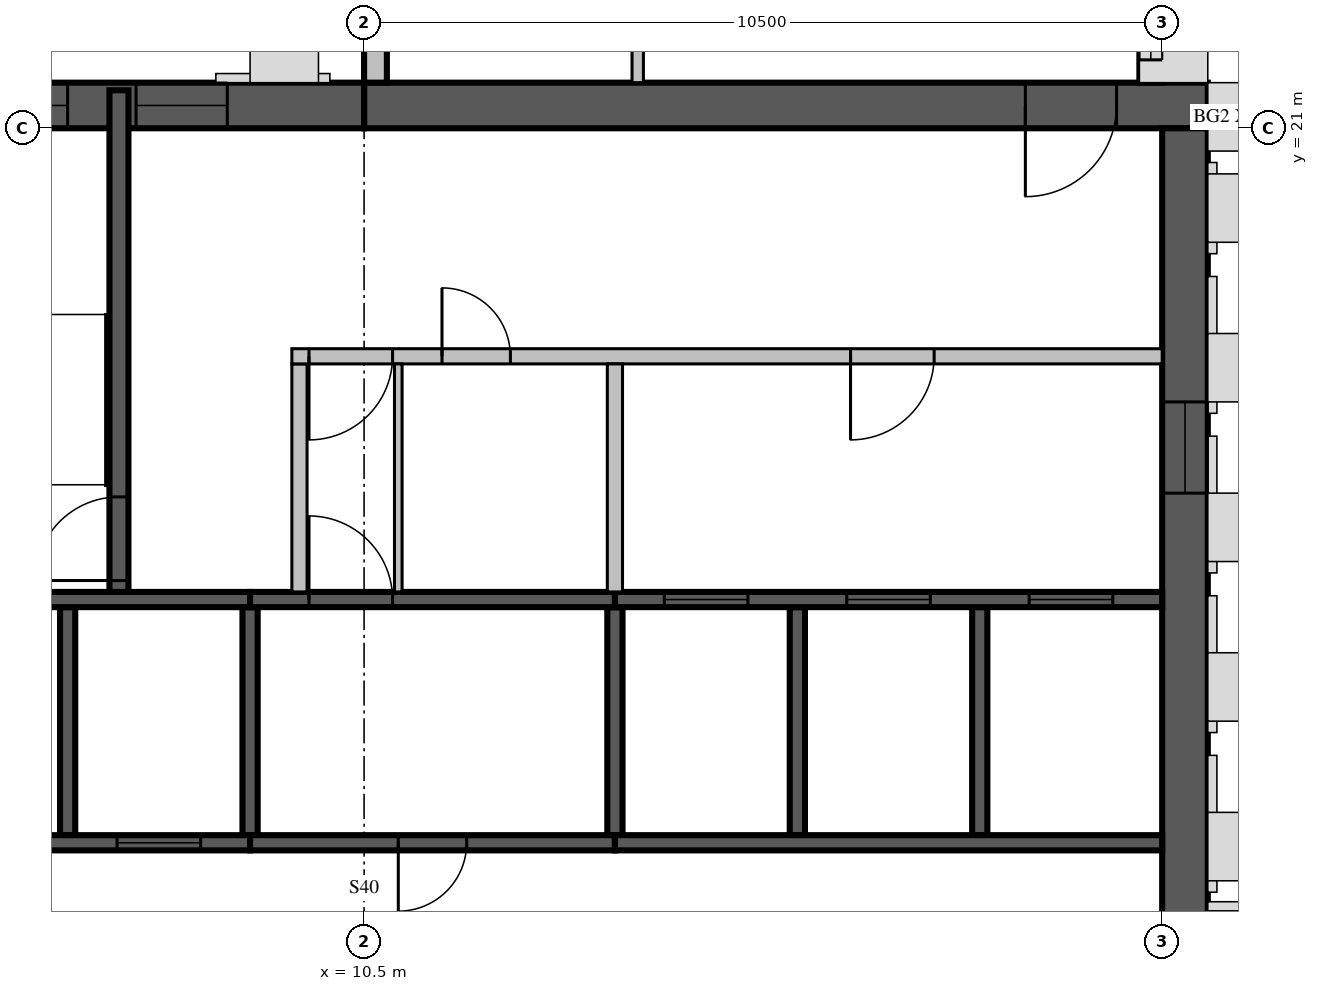
"""IFC4 building model, lengths in metres.
Left out: names, types, materials, properties, quantities, classifications, styles, units other than length and angle.
Written with IfcOpenShell. Run it as: python <this file> out.ifc"""

import sys

from ifc_helpers import new_model, si_unit, direction, frame, frame_2d, origin, place, context, subcontext, project, spatial, rectangle, extrude, source, transform, mapped, element, fill, save


model = new_model("IFC4")
c1 = context("Model", 3, precision=1e-05, world=origin(), true_north=direction((0.0, 1.0)))
c2 = subcontext(c1, "Body", "Model", "MODEL_VIEW")
j1 = project(units=[si_unit("LENGTHUNIT", "METRE"), si_unit("PLANEANGLEUNIT", "RADIAN")], contexts=[c1])
p1 = place(None, origin())
s1 = spatial("IfcSite", under=j1, at=p1, CompositionType="ELEMENT")
p2 = place(p1, origin())
s2 = spatial("IfcBuilding", under=s1, at=p2, CompositionType="ELEMENT")
p3 = place(p2, frame((0.0, 0.0, 351.0)))
s3 = spatial("IfcBuildingStorey", under=s2, at=p3, CompositionType="ELEMENT", Elevation=351.0)
m1 = source(origin(), c2, "Body", "SweptSolid", [
    extrude(rectangle(XDim=11.1, YDim=0.6, at=frame_2d((5.55, 0.0))), origin(), (0.0, 0.0, 1.0), 3.5),
])
p4 = place(p3, frame((10.5, 21.3, 0.0), z_axis=(0.0, 0.0, 1.0), x_axis=(1.0, 0.0, 0.0)))
e1 = element("IfcWall", 1, at=p4, inside=s3, PredefinedType="SHEAR", context=c2, shape_type="MappedRepresentation", body=[
    mapped(m1, transform((0.0, 0.0, 0.0), scale=1.0)),
])
m2 = source(origin(), c2, "Body", "SweptSolid", [
    extrude(rectangle(XDim=1.2, YDim=2.1, at=frame_2d((0.6, 1.05))), frame((0.0, 0.31, 0.0), z_axis=(0.0, -1.0, 0.0), x_axis=(1.0, 0.0, 0.0)), (0.0, 0.0, 1.0), 0.62),
])
p5 = place(p4, frame((8.7, 0.0, 0.0)))
e2 = element("IfcOpeningElement", 2, at=p5, cuts=e1, PredefinedType="OPENING", context=c2, shape_type="MappedRepresentation", body=[
    mapped(m2, transform((0.0, 0.0, 0.0), scale=1.0)),
])
m3 = source(origin(), c2, "Body", "SweptSolid", [
    extrude(rectangle(XDim=16.8, YDim=0.6, at=frame_2d((8.4, 0.0))), origin(), (0.0, 0.0, 1.0), 3.5),
])
p6 = place(p3, frame((21.3, 4.2, 0.0), z_axis=(0.0, 0.0, 1.0), x_axis=(0.0, 1.0, 0.0)))
e3 = element("IfcWall", 3, at=p6, inside=s3, PredefinedType="SHEAR", context=c2, shape_type="MappedRepresentation", body=[
    mapped(m3, transform((0.0, 0.0, 0.0), scale=1.0)),
])
m4 = source(origin(), c2, "Body", "SweptSolid", [
    extrude(rectangle(XDim=1.2, YDim=2.4, at=frame_2d((0.6, 1.2))), frame((0.0, 0.31, 0.0), z_axis=(0.0, -1.0, 0.0), x_axis=(1.0, 0.0, 0.0)), (0.0, 0.0, 1.0), 0.62),
])
p7 = place(p6, frame((12.0, 0.0, 0.6)))
e4 = element("IfcOpeningElement", 4, at=p7, cuts=e3, PredefinedType="OPENING", context=c2, shape_type="MappedRepresentation", body=[
    mapped(m4, transform((0.0, 0.0, 0.0), scale=1.0)),
])
m5 = source(origin(), c2, "Body", "SweptSolid", [
    extrude(rectangle(XDim=6.6, YDim=0.6, at=frame_2d((3.3, 0.0))), origin(), (0.0, 0.0, 1.0), 3.5),
])
p8 = place(p3, frame((3.9, 21.3, 0.0), z_axis=(0.0, 0.0, 1.0), x_axis=(1.0, 0.0, 0.0)))
e5 = element("IfcWall", 5, at=p8, inside=s3, PredefinedType="SHEAR", context=c2, shape_type="MappedRepresentation", body=[
    mapped(m5, transform((0.0, 0.0, 0.0), scale=1.0)),
])
p9 = place(p8, frame((1.5, 0.0, 0.6)))
e6 = element("IfcOpeningElement", 6, at=p9, cuts=e5, PredefinedType="OPENING", context=c2, shape_type="MappedRepresentation", body=[
    mapped(m4, transform((0.0, 0.0, 0.0), scale=1.0)),
])
p10 = place(p8, frame((3.6, 0.0, 0.6)))
e7 = element("IfcOpeningElement", 7, at=p10, cuts=e5, PredefinedType="OPENING", context=c2, shape_type="MappedRepresentation", body=[
    mapped(m4, transform((0.0, 0.0, 0.0), scale=1.0)),
])
m6 = source(origin(), c2, "Body", "SweptSolid", [
    extrude(rectangle(XDim=7.5, YDim=0.3, at=frame_2d((3.75, 0.0))), origin(), (0.0, 0.0, 1.0), 3.1),
])
p11 = place(p3, frame((20.85, 21.6, 0.0), z_axis=(0.0, 0.0, 1.0), x_axis=(0.0, 1.0, 0.0)))
e8 = element("IfcWall", 8, at=p11, inside=s3, PredefinedType="STANDARD", context=c2, shape_type="MappedRepresentation", body=[
    mapped(m6, transform((0.0, 0.0, 0.0), scale=1.0)),
])
m7 = source(origin(), c2, "Body", "SweptSolid", [
    extrude(rectangle(XDim=2.4, YDim=2.0, at=frame_2d((1.2, 1.0))), frame((0.0, 0.16, 0.0), z_axis=(0.0, -1.0, 0.0), x_axis=(1.0, 0.0, 0.0)), (0.0, 0.0, 1.0), 0.32),
])
p12 = place(p11, frame((0.3, 0.0, 0.6)))
e9 = element("IfcOpeningElement", 9, at=p12, cuts=e8, PredefinedType="OPENING", context=c2, shape_type="MappedRepresentation", body=[
    mapped(m7, transform((0.0, 0.0, 0.0), scale=1.0)),
])
m8 = source(origin(), c2, "Body", "SweptSolid", [
    extrude(rectangle(XDim=3.0, YDim=2.0, at=frame_2d((1.5, 1.0))), frame((0.0, 0.16, 0.0), z_axis=(0.0, -1.0, 0.0), x_axis=(1.0, 0.0, 0.0)), (0.0, 0.0, 1.0), 0.32),
])
p13 = place(p11, frame((4.2, 0.0, 0.6)))
e10 = element("IfcOpeningElement", 10, at=p13, cuts=e8, PredefinedType="OPENING", context=c2, shape_type="MappedRepresentation", body=[
    mapped(m8, transform((0.0, 0.0, 0.0), scale=1.0)),
])
p14 = place(p3, frame((10.65, 29.1, 0.0), z_axis=(0.0, 0.0, 1.0), x_axis=(0.0, -1.0, 0.0)))
e11 = element("IfcWall", 11, at=p14, inside=s3, PredefinedType="STANDARD", context=c2, shape_type="MappedRepresentation", body=[
    mapped(m6, transform((0.0, 0.0, 0.0), scale=1.0)),
])
m9 = source(origin(), c2, "Body", "SweptSolid", [
    extrude(rectangle(XDim=3.6, YDim=2.0, at=frame_2d((1.8, 1.0))), frame((0.0, 0.16, 0.0), z_axis=(0.0, -1.0, 0.0), x_axis=(1.0, 0.0, 0.0)), (0.0, 0.0, 1.0), 0.32),
])
p15 = place(p14, frame((3.36, 0.0, 0.6)))
e12 = element("IfcOpeningElement", 12, at=p15, cuts=e11, PredefinedType="OPENING", context=c2, shape_type="MappedRepresentation", body=[
    mapped(m9, transform((0.0, 0.0, 0.0), scale=1.0)),
])
p16 = place(p14, frame((0.48, 0.0, 0.6)))
e13 = element("IfcOpeningElement", 13, at=p16, cuts=e11, PredefinedType="OPENING", context=c2, shape_type="MappedRepresentation", body=[
    mapped(m7, transform((0.0, 0.0, 0.0), scale=1.0)),
])
m10 = source(origin(), c2, "Body", "SweptSolid", [
    extrude(rectangle(XDim=3.0, YDim=0.2, at=frame_2d((1.5, 0.0))), origin(), (0.0, 0.0, 1.0), 3.5),
])
p17 = place(p3, frame((6.6, 11.7, 0.0), z_axis=(0.0, 0.0, 1.0), x_axis=(0.0, 1.0, 0.0)))
e14 = element("IfcWall", 14, at=p17, inside=s3, PredefinedType="SOLIDWALL", context=c2, shape_type="MappedRepresentation", body=[
    mapped(m10, transform((0.0, 0.0, 0.0), scale=1.0)),
])
m11 = source(origin(), c2, "Body", "SweptSolid", [
    extrude(rectangle(XDim=3.0, YDim=0.2, at=frame_2d((1.5, 0.0))), origin(), (0.0, 0.0, 1.0), 3.1),
])
for number, where, z_axis, x_axis in (
    (15, (9.0, 11.7, 0.0), (0.0, 0.0, 1.0), (0.0, 1.0, 0.0)),
    (16, (13.8, 11.7, 0.0), (0.0, 0.0, 1.0), (0.0, 1.0, 0.0)),
):
    element("IfcWall", number, at=place(p3, frame(where, z_axis=z_axis, x_axis=x_axis)), inside=s3, PredefinedType="SOLIDWALL", context=c2, shape_type="MappedRepresentation", body=[
        mapped(m11, transform((0.0, 0.0, 0.0), scale=1.0)),
    ])
for number, where, z_axis, x_axis in (
    (17, (16.2, 11.7, 0.0), (0.0, 0.0, 1.0), (0.0, 1.0, 0.0)),
    (18, (18.6, 11.7, 0.0), (0.0, 0.0, 1.0), (0.0, 1.0, 0.0)),
):
    element("IfcWall", number, at=place(p3, frame(where, z_axis=z_axis, x_axis=x_axis)), inside=s3, PredefinedType="SOLIDWALL", context=c2, shape_type="MappedRepresentation", body=[
        mapped(m10, transform((0.0, 0.0, 0.0), scale=1.0)),
    ])
m12 = source(origin(), c2, "Body", "SweptSolid", [
    extrude(rectangle(XDim=4.8, YDim=0.2, at=frame_2d((2.4, 0.0))), origin(), (0.0, 0.0, 1.0), 3.5),
])
p18 = place(p3, frame((4.2, 11.6, 0.0), z_axis=(0.0, 0.0, 1.0), x_axis=(1.0, 0.0, 0.0)))
e19 = element("IfcWall", 19, at=p18, inside=s3, PredefinedType="SOLIDWALL", context=c2, shape_type="MappedRepresentation", body=[
    mapped(m12, transform((0.0, 0.0, 0.0), scale=1.0)),
])
m13 = source(origin(), c2, "Body", "SweptSolid", [
    extrude(rectangle(XDim=1.1, YDim=2.1, at=frame_2d((0.55, 1.05))), frame((0.0, 0.11, 0.0), z_axis=(0.0, -1.0, 0.0), x_axis=(1.0, 0.0, 0.0)), (0.0, 0.0, 1.0), 0.22),
])
p19 = place(p18, frame((0.65, 0.0, 0.0)))
e20 = element("IfcOpeningElement", 20, at=p19, cuts=e19, PredefinedType="OPENING", context=c2, shape_type="MappedRepresentation", body=[
    mapped(m13, transform((0.0, 0.0, 0.0), scale=1.0)),
])
p20 = place(p18, frame((3.05, 0.0, 0.0)))
e21 = element("IfcOpeningElement", 21, at=p20, cuts=e19, PredefinedType="OPENING", context=c2, shape_type="MappedRepresentation", body=[
    mapped(m13, transform((0.0, 0.0, 0.0), scale=1.0)),
])
m14 = source(origin(), c2, "Body", "SweptSolid", [
    extrude(rectangle(XDim=4.8, YDim=0.2, at=frame_2d((2.4, 0.0))), origin(), (0.0, 0.0, 1.0), 3.1),
])
p21 = place(p3, frame((9.0, 11.6, 0.0), z_axis=(0.0, 0.0, 1.0), x_axis=(1.0, 0.0, 0.0)))
e22 = element("IfcWall", 22, at=p21, inside=s3, PredefinedType="SOLIDWALL", context=c2, shape_type="MappedRepresentation", body=[
    mapped(m14, transform((0.0, 0.0, 0.0), scale=1.0)),
])
m15 = source(origin(), c2, "Body", "SweptSolid", [
    extrude(rectangle(XDim=0.9, YDim=2.1, at=frame_2d((0.45, 1.05))), frame((0.0, 0.11, 0.0), z_axis=(0.0, -1.0, 0.0), x_axis=(1.0, 0.0, 0.0)), (0.0, 0.0, 1.0), 0.22),
])
p22 = place(p21, frame((1.95, 0.0, 0.0)))
e23 = element("IfcOpeningElement", 23, at=p22, cuts=e22, PredefinedType="OPENING", context=c2, shape_type="MappedRepresentation", body=[
    mapped(m15, transform((0.0, 0.0, 0.0), scale=1.0)),
])
m16 = source(origin(), c2, "Body", "SweptSolid", [
    extrude(rectangle(XDim=7.2, YDim=0.2, at=frame_2d((3.6, 0.0))), origin(), (0.0, 0.0, 1.0), 3.5),
])
p23 = place(p3, frame((13.8, 11.6, 0.0), z_axis=(0.0, 0.0, 1.0), x_axis=(1.0, 0.0, 0.0)))
e24 = element("IfcWall", 24, at=p23, inside=s3, PredefinedType="SOLIDWALL", context=c2, shape_type="MappedRepresentation", body=[
    mapped(m16, transform((0.0, 0.0, 0.0), scale=1.0)),
])
p24 = place(p3, frame((4.2, 14.8, 0.0), z_axis=(0.0, 0.0, 1.0), x_axis=(1.0, 0.0, 0.0)))
e25 = element("IfcWall", 25, at=p24, inside=s3, PredefinedType="SOLIDWALL", context=c2, shape_type="MappedRepresentation", body=[
    mapped(m12, transform((0.0, 0.0, 0.0), scale=1.0)),
])
p25 = place(p3, frame((9.0, 14.8, 0.0), z_axis=(0.0, 0.0, 1.0), x_axis=(1.0, 0.0, 0.0)))
e26 = element("IfcWall", 26, at=p25, inside=s3, PredefinedType="SOLIDWALL", context=c2, shape_type="MappedRepresentation", body=[
    mapped(m14, transform((0.0, 0.0, 0.0), scale=1.0)),
])
p26 = place(p25, frame((0.775, 0.0, 0.0)))
e27 = element("IfcOpeningElement", 27, at=p26, cuts=e26, PredefinedType="OPENING", context=c2, shape_type="MappedRepresentation", body=[
    mapped(m13, transform((0.0, 0.0, 0.0), scale=1.0)),
])
p27 = place(p3, frame((13.8, 14.8, 0.0), z_axis=(0.0, 0.0, 1.0), x_axis=(1.0, 0.0, 0.0)))
e28 = element("IfcWall", 28, at=p27, inside=s3, PredefinedType="SOLIDWALL", context=c2, shape_type="MappedRepresentation", body=[
    mapped(m16, transform((0.0, 0.0, 0.0), scale=1.0)),
])
p28 = place(p27, frame((0.65, 0.0, 0.0)))
e29 = element("IfcOpeningElement", 29, at=p28, cuts=e28, PredefinedType="OPENING", context=c2, shape_type="MappedRepresentation", body=[
    mapped(m13, transform((0.0, 0.0, 0.0), scale=1.0)),
])
p29 = place(p27, frame((3.05, 0.0, 0.0)))
e30 = element("IfcOpeningElement", 30, at=p29, cuts=e28, PredefinedType="OPENING", context=c2, shape_type="MappedRepresentation", body=[
    mapped(m13, transform((0.0, 0.0, 0.0), scale=1.0)),
])
p30 = place(p27, frame((5.45, 0.0, 0.0)))
e31 = element("IfcOpeningElement", 31, at=p30, cuts=e28, PredefinedType="OPENING", context=c2, shape_type="MappedRepresentation", body=[
    mapped(m13, transform((0.0, 0.0, 0.0), scale=1.0)),
])
m17 = source(origin(), c2, "Body", "SweptSolid", [
    extrude(rectangle(XDim=6.6, YDim=0.25, at=frame_2d((3.3, 0.0))), origin(), (0.0, 0.0, 1.0), 3.1),
])
p31 = place(p3, frame((7.275, 14.9, 0.0), z_axis=(0.0, 0.0, 1.0), x_axis=(0.0, 1.0, 0.0)))
e32 = element("IfcWall", 32, at=p31, inside=s3, PredefinedType="SOLIDWALL", context=c2, shape_type="MappedRepresentation", body=[
    mapped(m17, transform((0.0, 0.0, 0.0), scale=1.0)),
])
m18 = source(origin(), c2, "Body", "SweptSolid", [
    extrude(rectangle(XDim=1.1, YDim=2.1, at=frame_2d((0.55, 1.05))), frame((0.0, 0.135, 0.0), z_axis=(0.0, -1.0, 0.0), x_axis=(1.0, 0.0, 0.0)), (0.0, 0.0, 1.0), 0.27),
])
p32 = place(p31, frame((0.15, 0.0, 0.0)))
e33 = element("IfcOpeningElement", 33, at=p32, cuts=e32, PredefinedType="OPENING", context=c2, shape_type="MappedRepresentation", body=[
    mapped(m18, transform((0.0, 0.0, 0.0), scale=1.0)),
])
m19 = source(origin(), c2, "Body", "SweptSolid", [
    extrude(rectangle(XDim=3.0, YDim=0.2, at=frame_2d((1.5, 0.0))), origin(), (0.0, 0.0, 1.0), 3.1),
])
p33 = place(p3, frame((9.65, 14.9, 0.0), z_axis=(0.0, 0.0, 1.0), x_axis=(0.0, 1.0, 0.0)))
e34 = element("IfcWall", 34, at=p33, inside=s3, PredefinedType="PARTITIONING", context=c2, shape_type="MappedRepresentation", body=[
    mapped(m19, transform((0.0, 0.0, 0.0), scale=1.0)),
])
m20 = source(origin(), c2, "Body", "SweptSolid", [
    extrude(rectangle(XDim=11.45, YDim=0.2, at=frame_2d((5.725, 0.0))), origin(), (0.0, 0.0, 1.0), 3.1),
])
p34 = place(p3, frame((9.55, 18.0, 0.0), z_axis=(0.0, 0.0, 1.0), x_axis=(1.0, 0.0, 0.0)))
e35 = element("IfcWall", 35, at=p34, inside=s3, PredefinedType="PARTITIONING", context=c2, shape_type="MappedRepresentation", body=[
    mapped(m20, transform((0.0, 0.0, 0.0), scale=1.0)),
])
p35 = place(p34, frame((0.225, 0.0, 0.0)))
e36 = element("IfcOpeningElement", 36, at=p35, cuts=e35, PredefinedType="OPENING", context=c2, shape_type="MappedRepresentation", body=[
    mapped(m13, transform((0.0, 0.0, 0.0), scale=1.0)),
])
p36 = place(p34, frame((1.975, 0.0, 0.0)))
e37 = element("IfcOpeningElement", 37, at=p36, cuts=e35, PredefinedType="OPENING", context=c2, shape_type="MappedRepresentation", body=[
    mapped(m15, transform((0.0, 0.0, 0.0), scale=1.0)),
])
p37 = place(p34, frame((7.35, 0.0, 0.0)))
e38 = element("IfcOpeningElement", 38, at=p37, cuts=e35, PredefinedType="OPENING", context=c2, shape_type="MappedRepresentation", body=[
    mapped(m13, transform((0.0, 0.0, 0.0), scale=1.0)),
])
p38 = place(p3, frame((13.8, 14.9, 0.0), z_axis=(0.0, 0.0, 1.0), x_axis=(0.0, 1.0, 0.0)))
e39 = element("IfcWall", 39, at=p38, inside=s3, PredefinedType="PARTITIONING", context=c2, shape_type="MappedRepresentation", body=[
    mapped(m19, transform((0.0, 0.0, 0.0), scale=1.0)),
])
m21 = source(origin(), c2, "Body", "SweptSolid", [
    extrude(rectangle(XDim=3.0, YDim=0.1, at=frame_2d((1.5, 0.0))), origin(), (0.0, 0.0, 1.0), 3.1),
])
p39 = place(p3, frame((10.95, 14.9, 0.0), z_axis=(0.0, 0.0, 1.0), x_axis=(0.0, 1.0, 0.0)))
e40 = element("IfcWall", 40, at=p39, inside=s3, PredefinedType="PARTITIONING", context=c2, shape_type="MappedRepresentation", body=[
    mapped(m21, transform((0.0, 0.0, 0.0), scale=1.0)),
])
m22 = source(origin(), c2, "Body", "SweptSolid", [
    extrude(rectangle(XDim=7.725, YDim=0.15, at=frame_2d((3.862, 0.0))), origin(), (0.0, 0.0, 1.0), 3.1),
])
p40 = place(p3, frame((14.1, 29.325, 0.0), z_axis=(0.0, 0.0, 1.0), x_axis=(0.0, -1.0, 0.0)))
e41 = element("IfcWall", 41, at=p40, inside=s3, PredefinedType="PARTITIONING", context=c2, shape_type="MappedRepresentation", body=[
    mapped(m22, transform((0.0, 0.0, 0.0), scale=1.0)),
])
m23 = source(origin(), c2, "Body", "SweptSolid", [
    extrude(rectangle(XDim=2.2, YDim=2.1, at=frame_2d((1.1, 1.05))), frame((0.0, 0.085, 0.0), z_axis=(0.0, -1.0, 0.0), x_axis=(1.0, 0.0, 0.0)), (0.0, 0.0, 1.0), 0.17),
])
p41 = place(p40, frame((4.925, 0.0, 0.0)))
e42 = element("IfcOpeningElement", 42, at=p41, cuts=e41, PredefinedType="OPENING", context=c2, shape_type="MappedRepresentation", body=[
    mapped(m23, transform((0.0, 0.0, 0.0), scale=1.0)),
])
m24 = source(origin(), c2, "Body", "SweptSolid", [
    extrude(rectangle(XDim=2.4, YDim=2.0, at=frame_2d((1.2, 1.0))), frame((0.0, 0.03, 0.0), z_axis=(0.0, -1.0, 0.0), x_axis=(1.0, 0.0, 0.0)), (0.0, 0.0, 1.0), 0.06),
])
p42 = place(p12, origin())
e43 = element("IfcWindow", 43, at=p42, inside=s3, PartitioningType="SINGLE_PANEL", PredefinedType="WINDOW", context=c2, shape_type="MappedRepresentation", body=[
    mapped(m24, transform((0.0, 0.0, 0.0), scale=1.0)),
])
fill(e9, e43)
m25 = source(origin(), c2, "Body", "SweptSolid", [
    extrude(rectangle(XDim=1.1, YDim=2.1, at=frame_2d((0.55, 1.05))), frame((0.0, 0.025, 0.0), z_axis=(0.0, -1.0, 0.0), x_axis=(1.0, 0.0, 0.0)), (0.0, 0.0, 1.0), 0.05),
])
p43 = place(p20, origin())
e44 = element("IfcDoor", 44, at=p43, inside=s3, OperationType="SLIDING_TO_LEFT", PredefinedType="DOOR", context=c2, shape_type="MappedRepresentation", body=[
    mapped(m25, transform((0.0, 0.0, 0.0), scale=1.0)),
])
fill(e21, e44)
m26 = source(origin(), c2, "Body", "SweptSolid", [
    extrude(rectangle(XDim=0.9, YDim=2.1, at=frame_2d((0.45, 1.05))), frame((0.0, 0.025, 0.0), z_axis=(0.0, -1.0, 0.0), x_axis=(1.0, 0.0, 0.0)), (0.0, 0.0, 1.0), 0.05),
])
p44 = place(p22, origin())
e45 = element("IfcDoor", 45, at=p44, inside=s3, OperationType="SINGLE_SWING_RIGHT", PredefinedType="DOOR", context=c2, shape_type="MappedRepresentation", body=[
    mapped(m26, transform((0.0, 0.0, 0.0), scale=1.0)),
])
fill(e23, e45)
p45 = place(p26, origin())
e46 = element("IfcDoor", 46, at=p45, inside=s3, OperationType="SINGLE_SWING_LEFT", PredefinedType="DOOR", context=c2, shape_type="MappedRepresentation", body=[
    mapped(m25, transform((0.0, 0.0, 0.0), scale=1.0)),
])
fill(e27, e46)
p46 = place(p28, origin())
e47 = element("IfcDoor", 47, at=p46, inside=s3, OperationType="SLIDING_TO_LEFT", PredefinedType="DOOR", context=c2, shape_type="MappedRepresentation", body=[
    mapped(m25, transform((0.0, 0.0, 0.0), scale=1.0)),
])
fill(e29, e47)
p47 = place(p29, origin())
e48 = element("IfcDoor", 48, at=p47, inside=s3, OperationType="SLIDING_TO_LEFT", PredefinedType="DOOR", context=c2, shape_type="MappedRepresentation", body=[
    mapped(m25, transform((0.0, 0.0, 0.0), scale=1.0)),
])
fill(e30, e48)
p48 = place(p30, origin())
e49 = element("IfcDoor", 49, at=p48, inside=s3, OperationType="SLIDING_TO_LEFT", PredefinedType="DOOR", context=c2, shape_type="MappedRepresentation", body=[
    mapped(m25, transform((0.0, 0.0, 0.0), scale=1.0)),
])
fill(e31, e49)
p49 = place(p32, origin())
e50 = element("IfcDoor", 50, at=p49, inside=s3, OperationType="SINGLE_SWING_LEFT", PredefinedType="DOOR", context=c2, shape_type="MappedRepresentation", body=[
    mapped(m25, transform((0.0, 0.0, 0.0), scale=1.0)),
])
fill(e33, e50)
p50 = place(p35, origin())
e51 = element("IfcDoor", 51, at=p50, inside=s3, OperationType="SINGLE_SWING_RIGHT", PredefinedType="DOOR", context=c2, shape_type="MappedRepresentation", body=[
    mapped(m25, transform((0.0, 0.0, 0.0), scale=1.0)),
])
fill(e36, e51)
p51 = place(p36, origin())
e52 = element("IfcDoor", 52, at=p51, inside=s3, OperationType="SINGLE_SWING_LEFT", PredefinedType="DOOR", context=c2, shape_type="MappedRepresentation", body=[
    mapped(m26, transform((0.0, 0.0, 0.0), scale=1.0)),
])
fill(e37, e52)
p52 = place(p37, origin())
e53 = element("IfcDoor", 53, at=p52, inside=s3, OperationType="SINGLE_SWING_RIGHT", PredefinedType="DOOR", context=c2, shape_type="MappedRepresentation", body=[
    mapped(m25, transform((0.0, 0.0, 0.0), scale=1.0)),
])
fill(e38, e53)
m27 = source(origin(), c2, "Body", "SweptSolid", [
    extrude(rectangle(XDim=1.2, YDim=2.1, at=frame_2d((0.6, 1.05))), frame((0.0, 0.025, 0.0), z_axis=(0.0, -1.0, 0.0), x_axis=(1.0, 0.0, 0.0)), (0.0, 0.0, 1.0), 0.05),
])
p53 = place(p5, origin())
e54 = element("IfcDoor", 54, at=p53, inside=s3, OperationType="SINGLE_SWING_RIGHT", PredefinedType="DOOR", context=c2, shape_type="MappedRepresentation", body=[
    mapped(m27, transform((0.0, 0.0, 0.0), scale=1.0)),
])
fill(e2, e54)
m28 = source(origin(), c2, "Body", "SweptSolid", [
    extrude(rectangle(XDim=1.2, YDim=2.4, at=frame_2d((0.6, 1.2))), frame((0.0, 0.03, 0.0), z_axis=(0.0, -1.0, 0.0), x_axis=(1.0, 0.0, 0.0)), (0.0, 0.0, 1.0), 0.06),
])
p54 = place(p7, origin())
e55 = element("IfcWindow", 55, at=p54, inside=s3, PartitioningType="SINGLE_PANEL", PredefinedType="WINDOW", context=c2, shape_type="MappedRepresentation", body=[
    mapped(m28, transform((0.0, 0.0, 0.0), scale=1.0)),
])
fill(e4, e55)
p55 = place(p9, origin())
e56 = element("IfcWindow", 56, at=p55, inside=s3, PartitioningType="SINGLE_PANEL", PredefinedType="WINDOW", context=c2, shape_type="MappedRepresentation", body=[
    mapped(m28, transform((0.0, 0.0, 0.0), scale=1.0)),
])
fill(e6, e56)
p56 = place(p10, origin())
e57 = element("IfcWindow", 57, at=p56, inside=s3, PartitioningType="SINGLE_PANEL", PredefinedType="WINDOW", context=c2, shape_type="MappedRepresentation", body=[
    mapped(m28, transform((0.0, 0.0, 0.0), scale=1.0)),
])
fill(e7, e57)
save(model, sys.argv[1])
